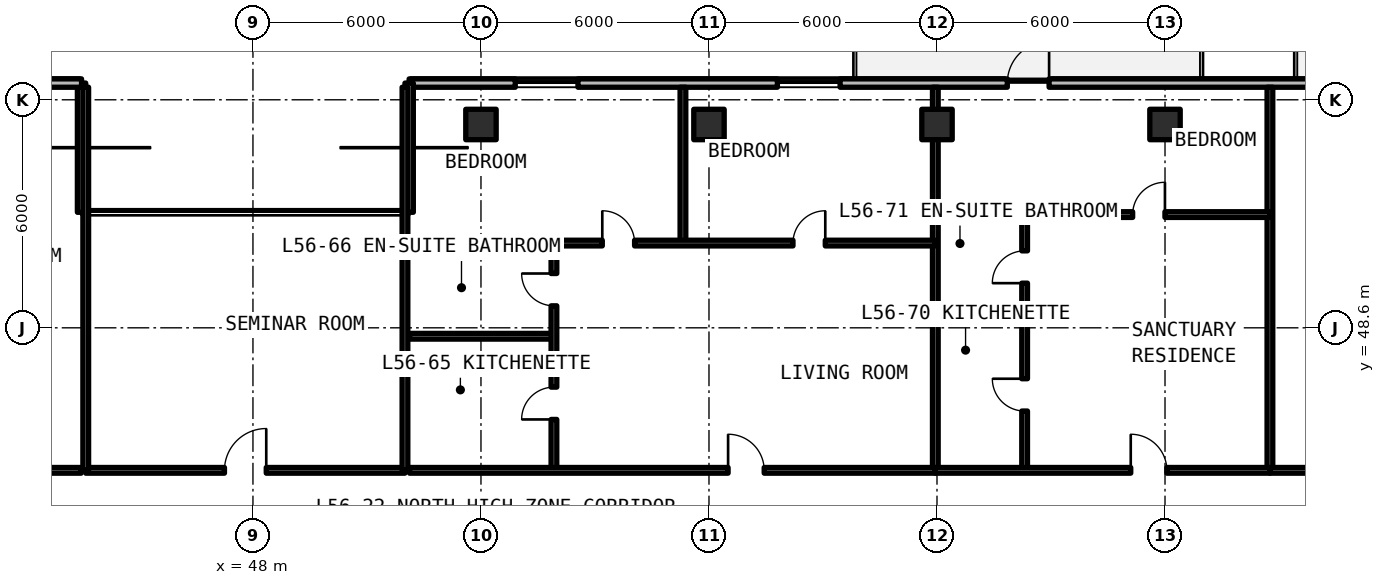
"""IFC4 building model, lengths in metres.
Left out: names, types, materials, properties, quantities, classifications, styles, units other than length and angle.
Written with IfcOpenShell. Run it as: python <this file> out.ifc"""

import sys

from ifc_helpers import new_model, si_unit, direction, frame, frame_2d, origin, origin_2d, place, context, subcontext, project, spatial, rectangle, extrude, element, fill, save


model = new_model("IFC4")
c1 = context("Model", 3, precision=1e-05, world=origin(), true_north=direction((0.0, 1.0)))
c2 = subcontext(c1, "Body", "Model", "MODEL_VIEW")
j1 = project(units=[si_unit("LENGTHUNIT", "METRE"), si_unit("PLANEANGLEUNIT", "RADIAN")], contexts=[c1])
p1 = place(None, origin())
s1 = spatial("IfcSite", under=j1, at=p1, CompositionType="ELEMENT")
p2 = place(p1, origin())
s2 = spatial("IfcBuilding", under=s1, at=p2, CompositionType="ELEMENT")
p3 = place(p2, frame((0.0, 0.0, 201.63)))
s3 = spatial("IfcBuildingStorey", under=s2, at=p3, CompositionType="ELEMENT", Elevation=201.63)
for number, where, z_axis, x_axis in (
    (1, (54.0, 53.95, 0.0), (0.0, 0.0, 1.0), (1.0, 0.0, 0.0)),
    (2, (60.0, 53.95, 0.0), (0.0, 0.0, 1.0), (1.0, 0.0, 0.0)),
    (3, (66.0, 53.95, 0.0), (0.0, 0.0, 1.0), (1.0, 0.0, 0.0)),
    (4, (72.0, 53.95, 0.0), (0.0, 0.0, 1.0), (1.0, 0.0, 0.0)),
):
    element("IfcColumn", number, at=place(p3, frame(where, z_axis=z_axis, x_axis=x_axis)), inside=s3, PredefinedType="COLUMN", context=c2, shape_type="SweptSolid", body=[
        extrude(rectangle(XDim=0.8, YDim=0.8, at=origin_2d()), origin(), (0.0, 0.0, 1.0), 3.3),
    ])
p4 = place(p3, frame((95.354, 55.04, 0.0), z_axis=(0.0, 0.0, 1.0), x_axis=(-1.0, 0.0, 0.0)))
e5 = element("IfcWall", 5, at=p4, inside=s3, PredefinedType="SOLIDWALL", context=c2, shape_type="SweptSolid", body=[
    extrude(rectangle(XDim=43.244, YDim=0.22, at=frame_2d((21.622, 0.0))), origin(), (0.0, 0.0, 1.0), 3.08),
])
p5 = place(p4, frame((26.404, 0.0, 0.0)))
e6 = element("IfcOpeningElement", 6, at=p5, cuts=e5, PredefinedType="OPENING", context=c2, shape_type="SweptSolid", body=[
    extrude(rectangle(XDim=1.1, YDim=2.15, at=frame_2d((0.55, 1.075))), frame((0.0, 0.12, 0.0), z_axis=(0.0, -1.0, 0.0), x_axis=(1.0, 0.0, 0.0)), (0.0, 0.0, 1.0), 0.24),
])
p6 = place(p4, frame((14.554, 0.0, 0.0)))
e7 = element("IfcOpeningElement", 7, at=p6, cuts=e5, PredefinedType="OPENING", context=c2, shape_type="SweptSolid", body=[
    extrude(rectangle(XDim=1.1, YDim=2.15, at=frame_2d((0.55, 1.075))), frame((0.0, 0.12, 0.0), z_axis=(0.0, -1.0, 0.0), x_axis=(1.0, 0.0, 0.0)), (0.0, 0.0, 1.0), 0.24),
])
p7 = place(p4, frame((38.802, 0.0, 0.78)))
e8 = element("IfcOpeningElement", 8, at=p7, cuts=e5, PredefinedType="OPENING", context=c2, shape_type="SweptSolid", body=[
    extrude(rectangle(XDim=1.65, YDim=1.66, at=frame_2d((0.825, 0.83))), frame((0.0, 0.12, 0.0), z_axis=(0.0, -1.0, 0.0), x_axis=(1.0, 0.0, 0.0)), (0.0, 0.0, 1.0), 0.24),
])
p8 = place(p4, frame((31.904, 0.0, 0.78)))
e9 = element("IfcOpeningElement", 9, at=p8, cuts=e5, PredefinedType="OPENING", context=c2, shape_type="SweptSolid", body=[
    extrude(rectangle(XDim=1.65, YDim=1.66, at=frame_2d((0.825, 0.83))), frame((0.0, 0.12, 0.0), z_axis=(0.0, -1.0, 0.0), x_axis=(1.0, 0.0, 0.0)), (0.0, 0.0, 1.0), 0.24),
])
p9 = place(p4, frame((7.682, 0.0, 0.78)))
e10 = element("IfcOpeningElement", 10, at=p9, cuts=e5, PredefinedType="OPENING", context=c2, shape_type="SweptSolid", body=[
    extrude(rectangle(XDim=0.85, YDim=1.65, at=frame_2d((0.425, 0.825))), frame((0.0, 0.12, 0.0), z_axis=(0.0, -1.0, 0.0), x_axis=(1.0, 0.0, 0.0)), (0.0, 0.0, 1.0), 0.24),
])
p10 = place(p4, frame((2.899, 0.0, 0.78)))
e11 = element("IfcOpeningElement", 11, at=p10, cuts=e5, PredefinedType="OPENING", context=c2, shape_type="SweptSolid", body=[
    extrude(rectangle(XDim=1.65, YDim=1.66, at=frame_2d((0.825, 0.83))), frame((0.0, 0.12, 0.0), z_axis=(0.0, -1.0, 0.0), x_axis=(1.0, 0.0, 0.0)), (0.0, 0.0, 1.0), 0.24),
])
for number, where, z_axis, x_axis in (
    (12, (52.11, 55.04, 0.0), (0.0, 0.0, 1.0), (0.0, -1.0, 0.0)),
    (13, (43.49, 51.64, 0.0), (0.0, 0.0, 1.0), (0.0, 1.0, 0.0)),
):
    element("IfcWall", number, at=place(p3, frame(where, z_axis=z_axis, x_axis=x_axis)), inside=s3, PredefinedType="SOLIDWALL", context=c2, shape_type="SweptSolid", body=[
        extrude(rectangle(XDim=3.4, YDim=0.22, at=frame_2d((1.7, 0.0))), origin(), (0.0, 0.0, 1.0), 3.08),
    ])
p11 = place(p3, frame((43.49, 55.04, 0.0), z_axis=(0.0, 0.0, 1.0), x_axis=(-1.0, 0.0, 0.0)))
e14 = element("IfcWall", 14, at=p11, inside=s3, PredefinedType="SOLIDWALL", context=c2, shape_type="SweptSolid", body=[
    extrude(rectangle(XDim=17.644, YDim=0.22, at=frame_2d((8.822, 0.0))), origin(), (0.0, 0.0, 1.0), 3.08),
])
p12 = place(p11, frame((9.34, 0.0, 0.0)))
e15 = element("IfcOpeningElement", 15, at=p12, cuts=e14, PredefinedType="OPENING", context=c2, shape_type="SweptSolid", body=[
    extrude(rectangle(XDim=1.1, YDim=2.15, at=frame_2d((0.55, 1.075))), frame((0.0, 0.12, 0.0), z_axis=(0.0, -1.0, 0.0), x_axis=(1.0, 0.0, 0.0)), (0.0, 0.0, 1.0), 0.24),
])
p13 = place(p11, frame((14.715, 0.0, 0.78)))
e16 = element("IfcOpeningElement", 16, at=p13, cuts=e14, PredefinedType="OPENING", context=c2, shape_type="SweptSolid", body=[
    extrude(rectangle(XDim=1.65, YDim=1.66, at=frame_2d((0.825, 0.83))), frame((0.0, 0.12, 0.0), z_axis=(0.0, -1.0, 0.0), x_axis=(1.0, 0.0, 0.0)), (0.0, 0.0, 1.0), 0.24),
])
p14 = place(p11, frame((4.932, 0.0, 0.78)))
e17 = element("IfcOpeningElement", 17, at=p14, cuts=e14, PredefinedType="OPENING", context=c2, shape_type="SweptSolid", body=[
    extrude(rectangle(XDim=1.65, YDim=1.66, at=frame_2d((0.825, 0.83))), frame((0.0, 0.12, 0.0), z_axis=(0.0, -1.0, 0.0), x_axis=(1.0, 0.0, 0.0)), (0.0, 0.0, 1.0), 0.24),
])
p15 = place(p11, frame((2.407, 0.0, 0.78)))
e18 = element("IfcOpeningElement", 18, at=p15, cuts=e14, PredefinedType="OPENING", context=c2, shape_type="SweptSolid", body=[
    extrude(rectangle(XDim=0.85, YDim=1.65, at=frame_2d((0.425, 0.825))), frame((0.0, 0.12, 0.0), z_axis=(0.0, -1.0, 0.0), x_axis=(1.0, 0.0, 0.0)), (0.0, 0.0, 1.0), 0.24),
])
p16 = place(p3, frame((43.6, 44.85, 0.0), z_axis=(0.0, 0.0, 1.0), x_axis=(1.0, 0.0, 0.0)))
e19 = element("IfcWall", 19, at=p16, inside=s3, PredefinedType="SOLIDWALL", context=c2, shape_type="SweptSolid", body=[
    extrude(rectangle(XDim=8.4, YDim=0.15, at=frame_2d((4.2, 0.0))), origin(), (0.0, 0.0, 1.0), 2.35),
])
p17 = place(p16, frame((3.65, 0.0, 0.0)))
e20 = element("IfcOpeningElement", 20, at=p17, cuts=e19, PredefinedType="OPENING", context=c2, shape_type="SweptSolid", body=[
    extrude(rectangle(XDim=1.1, YDim=2.15, at=frame_2d((0.55, 1.075))), frame((0.0, 0.085, 0.0), z_axis=(0.0, -1.0, 0.0), x_axis=(1.0, 0.0, 0.0)), (0.0, 0.0, 1.0), 0.17),
])
for number, where, z_axis, x_axis in (
    (21, (43.6, 44.85, 0.0), (0.0, 0.0, 1.0), (0.0, 1.0, 0.0)),
    (22, (52.0, 44.85, 0.0), (0.0, 0.0, 1.0), (0.0, 1.0, 0.0)),
):
    element("IfcWall", number, at=place(p3, frame(where, z_axis=z_axis, x_axis=x_axis)), inside=s3, PredefinedType="SOLIDWALL", context=c2, shape_type="SweptSolid", body=[
        extrude(rectangle(XDim=10.08, YDim=0.15, at=frame_2d((5.04, 0.0))), origin(), (0.0, 0.0, 1.0), 2.35),
    ])
p18 = place(p3, frame((39.435, 44.85, 0.0), z_axis=(0.0, 0.0, 1.0), x_axis=(1.0, 0.0, 0.0)))
e23 = element("IfcWall", 23, at=p18, inside=s3, PredefinedType="SOLIDWALL", context=c2, shape_type="SweptSolid", body=[
    extrude(rectangle(XDim=4.045, YDim=0.15, at=frame_2d((2.022, 0.0))), origin(), (0.0, 0.0, 1.0), 2.35),
])
p19 = place(p18, frame((1.547, 0.0, 0.0)))
e24 = element("IfcOpeningElement", 24, at=p19, cuts=e23, PredefinedType="OPENING", context=c2, shape_type="SweptSolid", body=[
    extrude(rectangle(XDim=0.95, YDim=2.15, at=frame_2d((0.475, 1.075))), frame((0.0, 0.085, 0.0), z_axis=(0.0, -1.0, 0.0), x_axis=(1.0, 0.0, 0.0)), (0.0, 0.0, 1.0), 0.17),
])
p20 = place(p3, frame((65.956, 44.85, 0.0), z_axis=(0.0, 0.0, 1.0), x_axis=(0.0, 1.0, 0.0)))
e25 = element("IfcWall", 25, at=p20, inside=s3, PredefinedType="SOLIDWALL", context=c2, shape_type="SweptSolid", body=[
    extrude(rectangle(XDim=10.08, YDim=0.15, at=frame_2d((5.04, 0.0))), origin(), (0.0, 0.0, 1.0), 2.35),
])
p21 = place(p3, frame((52.12, 48.378, 0.0), z_axis=(0.0, 0.0, 1.0), x_axis=(1.0, 0.0, 0.0)))
e26 = element("IfcWall", 26, at=p21, inside=s3, PredefinedType="PARTITIONING", context=c2, shape_type="SweptSolid", body=[
    extrude(rectangle(XDim=3.8, YDim=0.15, at=frame_2d((1.9, 0.0))), origin(), (0.0, 0.0, 1.0), 2.35),
])
p22 = place(p3, frame((55.92, 44.85, 0.0), z_axis=(0.0, 0.0, 1.0), x_axis=(0.0, 1.0, 0.0)))
e27 = element("IfcWall", 27, at=p22, inside=s3, PredefinedType="PARTITIONING", context=c2, shape_type="SweptSolid", body=[
    extrude(rectangle(XDim=5.98, YDim=0.15, at=frame_2d((2.99, 0.0))), origin(), (0.0, 0.0, 1.0), 2.35),
])
p23 = place(p22, frame((1.339, 0.0, 0.0)))
e28 = element("IfcOpeningElement", 28, at=p23, cuts=e27, PredefinedType="OPENING", context=c2, shape_type="SweptSolid", body=[
    extrude(rectangle(XDim=0.85, YDim=2.1, at=frame_2d((0.425, 1.05))), frame((0.0, 0.085, 0.0), z_axis=(0.0, -1.0, 0.0), x_axis=(1.0, 0.0, 0.0)), (0.0, 0.0, 1.0), 0.17),
])
p24 = place(p22, frame((4.329, 0.0, 0.0)))
e29 = element("IfcOpeningElement", 29, at=p24, cuts=e27, PredefinedType="OPENING", context=c2, shape_type="SweptSolid", body=[
    extrude(rectangle(XDim=0.85, YDim=2.1, at=frame_2d((0.425, 1.05))), frame((0.0, 0.085, 0.0), z_axis=(0.0, -1.0, 0.0), x_axis=(1.0, 0.0, 0.0)), (0.0, 0.0, 1.0), 0.17),
])
p25 = place(p3, frame((59.315, 50.83, 0.0), z_axis=(0.0, 0.0, 1.0), x_axis=(0.0, 1.0, 0.0)))
e30 = element("IfcWall", 30, at=p25, inside=s3, PredefinedType="PARTITIONING", context=c2, shape_type="SweptSolid", body=[
    extrude(rectangle(XDim=4.1, YDim=0.15, at=frame_2d((2.05, 0.0))), origin(), (0.0, 0.0, 1.0), 2.35),
])
p26 = place(p3, frame((52.12, 50.83, 0.0), z_axis=(0.0, 0.0, 1.0), x_axis=(1.0, 0.0, 0.0)))
e31 = element("IfcWall", 31, at=p26, inside=s3, PredefinedType="PARTITIONING", context=c2, shape_type="SweptSolid", body=[
    extrude(rectangle(XDim=13.836, YDim=0.15, at=frame_2d((6.918, 0.0))), origin(), (0.0, 0.0, 1.0), 2.35),
])
p27 = place(p26, frame((5.073, 0.0, 0.0)))
e32 = element("IfcOpeningElement", 32, at=p27, cuts=e31, PredefinedType="OPENING", context=c2, shape_type="SweptSolid", body=[
    extrude(rectangle(XDim=0.85, YDim=2.1, at=frame_2d((0.425, 1.05))), frame((0.0, 0.085, 0.0), z_axis=(0.0, -1.0, 0.0), x_axis=(1.0, 0.0, 0.0)), (0.0, 0.0, 1.0), 0.17),
])
p28 = place(p26, frame((10.09, 0.0, 0.0)))
e33 = element("IfcOpeningElement", 33, at=p28, cuts=e31, PredefinedType="OPENING", context=c2, shape_type="SweptSolid", body=[
    extrude(rectangle(XDim=0.85, YDim=2.1, at=frame_2d((0.425, 1.05))), frame((0.0, 0.085, 0.0), z_axis=(0.0, -1.0, 0.0), x_axis=(1.0, 0.0, 0.0)), (0.0, 0.0, 1.0), 0.17),
])
p29 = place(p3, frame((52.12, 44.85, 0.0), z_axis=(0.0, 0.0, 1.0), x_axis=(1.0, 0.0, 0.0)))
e34 = element("IfcWall", 34, at=p29, inside=s3, PredefinedType="SOLIDWALL", context=c2, shape_type="SweptSolid", body=[
    extrude(rectangle(XDim=13.836, YDim=0.15, at=frame_2d((6.918, 0.0))), origin(), (0.0, 0.0, 1.0), 2.35),
])
p30 = place(p29, frame((8.383, 0.0, 0.0)))
e35 = element("IfcOpeningElement", 35, at=p30, cuts=e34, PredefinedType="OPENING", context=c2, shape_type="SweptSolid", body=[
    extrude(rectangle(XDim=0.95, YDim=2.15, at=frame_2d((0.475, 1.075))), frame((0.0, 0.085, 0.0), z_axis=(0.0, -1.0, 0.0), x_axis=(1.0, 0.0, 0.0)), (0.0, 0.0, 1.0), 0.17),
])
p31 = place(p3, frame((74.76, 44.85, 0.0), z_axis=(0.0, 0.0, 1.0), x_axis=(0.0, 1.0, 0.0)))
e36 = element("IfcWall", 36, at=p31, inside=s3, PredefinedType="SOLIDWALL", context=c2, shape_type="SweptSolid", body=[
    extrude(rectangle(XDim=10.08, YDim=0.15, at=frame_2d((5.04, 0.0))), origin(), (0.0, 0.0, 1.0), 2.35),
])
p32 = place(p3, frame((65.956, 48.82, 0.0), z_axis=(0.0, 0.0, 1.0), x_axis=(1.0, 0.0, 0.0)))
e37 = element("IfcWall", 37, at=p32, inside=s3, PredefinedType="PARTITIONING", context=c2, shape_type="SweptSolid", body=[
    extrude(rectangle(XDim=2.35, YDim=0.15, at=frame_2d((1.175, 0.0))), origin(), (0.0, 0.0, 1.0), 2.35),
])
p33 = place(p3, frame((68.306, 44.85, 0.0), z_axis=(0.0, 0.0, 1.0), x_axis=(0.0, 1.0, 0.0)))
e38 = element("IfcWall", 38, at=p33, inside=s3, PredefinedType="PARTITIONING", context=c2, shape_type="SweptSolid", body=[
    extrude(rectangle(XDim=6.729, YDim=0.15, at=frame_2d((3.365, 0.0))), origin(), (0.0, 0.0, 1.0), 2.35),
])
p34 = place(p33, frame((1.56, 0.0, 0.0)))
e39 = element("IfcOpeningElement", 39, at=p34, cuts=e38, PredefinedType="OPENING", context=c2, shape_type="SweptSolid", body=[
    extrude(rectangle(XDim=0.85, YDim=2.1, at=frame_2d((0.425, 1.05))), frame((0.0, 0.085, 0.0), z_axis=(0.0, -1.0, 0.0), x_axis=(1.0, 0.0, 0.0)), (0.0, 0.0, 1.0), 0.17),
])
p35 = place(p33, frame((4.925, 0.0, 0.0)))
e40 = element("IfcOpeningElement", 40, at=p35, cuts=e38, PredefinedType="OPENING", context=c2, shape_type="SweptSolid", body=[
    extrude(rectangle(XDim=0.85, YDim=2.1, at=frame_2d((0.425, 1.05))), frame((0.0, 0.085, 0.0), z_axis=(0.0, -1.0, 0.0), x_axis=(1.0, 0.0, 0.0)), (0.0, 0.0, 1.0), 0.17),
])
p36 = place(p3, frame((65.956, 51.58, 0.0), z_axis=(0.0, 0.0, 1.0), x_axis=(1.0, 0.0, 0.0)))
e41 = element("IfcWall", 41, at=p36, inside=s3, PredefinedType="PARTITIONING", context=c2, shape_type="SweptSolid", body=[
    extrude(rectangle(XDim=8.805, YDim=0.15, at=frame_2d((4.402, 0.0))), origin(), (0.0, 0.0, 1.0), 2.35),
])
p37 = place(p36, frame((5.192, 0.0, 0.0)))
e42 = element("IfcOpeningElement", 42, at=p37, cuts=e41, PredefinedType="OPENING", context=c2, shape_type="SweptSolid", body=[
    extrude(rectangle(XDim=0.85, YDim=2.1, at=frame_2d((0.425, 1.05))), frame((0.0, 0.085, 0.0), z_axis=(0.0, -1.0, 0.0), x_axis=(1.0, 0.0, 0.0)), (0.0, 0.0, 1.0), 0.17),
])
p38 = place(p3, frame((65.956, 44.85, 0.0), z_axis=(0.0, 0.0, 1.0), x_axis=(1.0, 0.0, 0.0)))
e43 = element("IfcWall", 43, at=p38, inside=s3, PredefinedType="SOLIDWALL", context=c2, shape_type="SweptSolid", body=[
    extrude(rectangle(XDim=8.805, YDim=0.15, at=frame_2d((4.402, 0.0))), origin(), (0.0, 0.0, 1.0), 2.35),
])
p39 = place(p38, frame((5.142, 0.0, 0.0)))
e44 = element("IfcOpeningElement", 44, at=p39, cuts=e43, PredefinedType="OPENING", context=c2, shape_type="SweptSolid", body=[
    extrude(rectangle(XDim=0.95, YDim=2.15, at=frame_2d((0.475, 1.075))), frame((0.0, 0.085, 0.0), z_axis=(0.0, -1.0, 0.0), x_axis=(1.0, 0.0, 0.0)), (0.0, 0.0, 1.0), 0.17),
])
p40 = place(p3, frame((74.76, 44.85, 0.0), z_axis=(0.0, 0.0, 1.0), x_axis=(1.0, 0.0, 0.0)))
e45 = element("IfcWall", 45, at=p40, inside=s3, PredefinedType="SOLIDWALL", context=c2, shape_type="SweptSolid", body=[
    extrude(rectangle(XDim=11.635, YDim=0.15, at=frame_2d((5.817, 0.0))), origin(), (0.0, 0.0, 1.0), 2.35),
])
p41 = place(p40, frame((5.267, 0.0, 0.0)))
e46 = element("IfcOpeningElement", 46, at=p41, cuts=e45, PredefinedType="OPENING", context=c2, shape_type="SweptSolid", body=[
    extrude(rectangle(XDim=1.1, YDim=2.15, at=frame_2d((0.55, 1.075))), frame((0.0, 0.085, 0.0), z_axis=(0.0, -1.0, 0.0), x_axis=(1.0, 0.0, 0.0)), (0.0, 0.0, 1.0), 0.17),
])
p42 = place(p5, frame((1.1, 0.0, 0.0), z_axis=(0.0, 0.0, 1.0), x_axis=(-1.0, 0.0, 0.0)))
e47 = element("IfcDoor", 47, at=p42, inside=s3, OperationType="SINGLE_SWING_RIGHT", PredefinedType="DOOR", context=c2, shape_type="SweptSolid", body=[
    extrude(rectangle(XDim=1.1, YDim=2.15, at=frame_2d((0.55, 1.075))), frame((0.0, 0.025, 0.0), z_axis=(0.0, -1.0, 0.0), x_axis=(1.0, 0.0, 0.0)), (0.0, 0.0, 1.0), 0.05),
])
fill(e6, e47)
p43 = place(p7, origin())
e48 = element("IfcWindow", 48, at=p43, inside=s3, PartitioningType="SINGLE_PANEL", PredefinedType="WINDOW", context=c2, shape_type="SweptSolid", body=[
    extrude(rectangle(XDim=1.65, YDim=1.66, at=frame_2d((0.825, 0.83))), frame((0.0, 0.03, 0.0), z_axis=(0.0, -1.0, 0.0), x_axis=(1.0, 0.0, 0.0)), (0.0, 0.0, 1.0), 0.06),
])
fill(e8, e48)
p44 = place(p8, origin())
e49 = element("IfcWindow", 49, at=p44, inside=s3, PartitioningType="SINGLE_PANEL", PredefinedType="WINDOW", context=c2, shape_type="SweptSolid", body=[
    extrude(rectangle(XDim=1.65, YDim=1.66, at=frame_2d((0.825, 0.83))), frame((0.0, 0.03, 0.0), z_axis=(0.0, -1.0, 0.0), x_axis=(1.0, 0.0, 0.0)), (0.0, 0.0, 1.0), 0.06),
])
fill(e9, e49)
p45 = place(p17, origin())
e50 = element("IfcDoor", 50, at=p45, inside=s3, OperationType="SINGLE_SWING_RIGHT", PredefinedType="DOOR", context=c2, shape_type="SweptSolid", body=[
    extrude(rectangle(XDim=1.1, YDim=2.15, at=frame_2d((0.55, 1.075))), frame((0.0, 0.025, 0.0), z_axis=(0.0, -1.0, 0.0), x_axis=(1.0, 0.0, 0.0)), (0.0, 0.0, 1.0), 0.05),
])
fill(e20, e50)
p46 = place(p23, origin())
e51 = element("IfcDoor", 51, at=p46, inside=s3, OperationType="SINGLE_SWING_LEFT", PredefinedType="DOOR", context=c2, shape_type="SweptSolid", body=[
    extrude(rectangle(XDim=0.85, YDim=2.1, at=frame_2d((0.425, 1.05))), frame((0.0, 0.025, 0.0), z_axis=(0.0, -1.0, 0.0), x_axis=(1.0, 0.0, 0.0)), (0.0, 0.0, 1.0), 0.05),
])
fill(e28, e51)
p47 = place(p24, origin())
e52 = element("IfcDoor", 52, at=p47, inside=s3, OperationType="SINGLE_SWING_RIGHT", PredefinedType="DOOR", context=c2, shape_type="SweptSolid", body=[
    extrude(rectangle(XDim=0.85, YDim=2.1, at=frame_2d((0.425, 1.05))), frame((0.0, 0.025, 0.0), z_axis=(0.0, -1.0, 0.0), x_axis=(1.0, 0.0, 0.0)), (0.0, 0.0, 1.0), 0.05),
])
fill(e29, e52)
p48 = place(p27, origin())
e53 = element("IfcDoor", 53, at=p48, inside=s3, OperationType="SINGLE_SWING_LEFT", PredefinedType="DOOR", context=c2, shape_type="SweptSolid", body=[
    extrude(rectangle(XDim=0.85, YDim=2.1, at=frame_2d((0.425, 1.05))), frame((0.0, 0.025, 0.0), z_axis=(0.0, -1.0, 0.0), x_axis=(1.0, 0.0, 0.0)), (0.0, 0.0, 1.0), 0.05),
])
fill(e32, e53)
p49 = place(p28, origin())
e54 = element("IfcDoor", 54, at=p49, inside=s3, OperationType="SINGLE_SWING_RIGHT", PredefinedType="DOOR", context=c2, shape_type="SweptSolid", body=[
    extrude(rectangle(XDim=0.85, YDim=2.1, at=frame_2d((0.425, 1.05))), frame((0.0, 0.025, 0.0), z_axis=(0.0, -1.0, 0.0), x_axis=(1.0, 0.0, 0.0)), (0.0, 0.0, 1.0), 0.05),
])
fill(e33, e54)
p50 = place(p30, origin())
e55 = element("IfcDoor", 55, at=p50, inside=s3, OperationType="SINGLE_SWING_LEFT", PredefinedType="DOOR", context=c2, shape_type="SweptSolid", body=[
    extrude(rectangle(XDim=0.95, YDim=2.15, at=frame_2d((0.475, 1.075))), frame((0.0, 0.025, 0.0), z_axis=(0.0, -1.0, 0.0), x_axis=(1.0, 0.0, 0.0)), (0.0, 0.0, 1.0), 0.05),
])
fill(e35, e55)
p51 = place(p34, origin())
e56 = element("IfcDoor", 56, at=p51, inside=s3, OperationType="SINGLE_SWING_RIGHT", PredefinedType="DOOR", context=c2, shape_type="SweptSolid", body=[
    extrude(rectangle(XDim=0.85, YDim=2.1, at=frame_2d((0.425, 1.05))), frame((0.0, 0.025, 0.0), z_axis=(0.0, -1.0, 0.0), x_axis=(1.0, 0.0, 0.0)), (0.0, 0.0, 1.0), 0.05),
])
fill(e39, e56)
p52 = place(p35, origin())
e57 = element("IfcDoor", 57, at=p52, inside=s3, OperationType="SINGLE_SWING_LEFT", PredefinedType="DOOR", context=c2, shape_type="SweptSolid", body=[
    extrude(rectangle(XDim=0.85, YDim=2.1, at=frame_2d((0.425, 1.05))), frame((0.0, 0.025, 0.0), z_axis=(0.0, -1.0, 0.0), x_axis=(1.0, 0.0, 0.0)), (0.0, 0.0, 1.0), 0.05),
])
fill(e40, e57)
p53 = place(p37, origin())
e58 = element("IfcDoor", 58, at=p53, inside=s3, OperationType="SINGLE_SWING_RIGHT", PredefinedType="DOOR", context=c2, shape_type="SweptSolid", body=[
    extrude(rectangle(XDim=0.85, YDim=2.1, at=frame_2d((0.425, 1.05))), frame((0.0, 0.025, 0.0), z_axis=(0.0, -1.0, 0.0), x_axis=(1.0, 0.0, 0.0)), (0.0, 0.0, 1.0), 0.05),
])
fill(e42, e58)
p54 = place(p39, origin())
e59 = element("IfcDoor", 59, at=p54, inside=s3, OperationType="SINGLE_SWING_LEFT", PredefinedType="DOOR", context=c2, shape_type="SweptSolid", body=[
    extrude(rectangle(XDim=0.95, YDim=2.15, at=frame_2d((0.475, 1.075))), frame((0.0, 0.025, 0.0), z_axis=(0.0, -1.0, 0.0), x_axis=(1.0, 0.0, 0.0)), (0.0, 0.0, 1.0), 0.05),
])
fill(e44, e59)
save(model, sys.argv[1])
